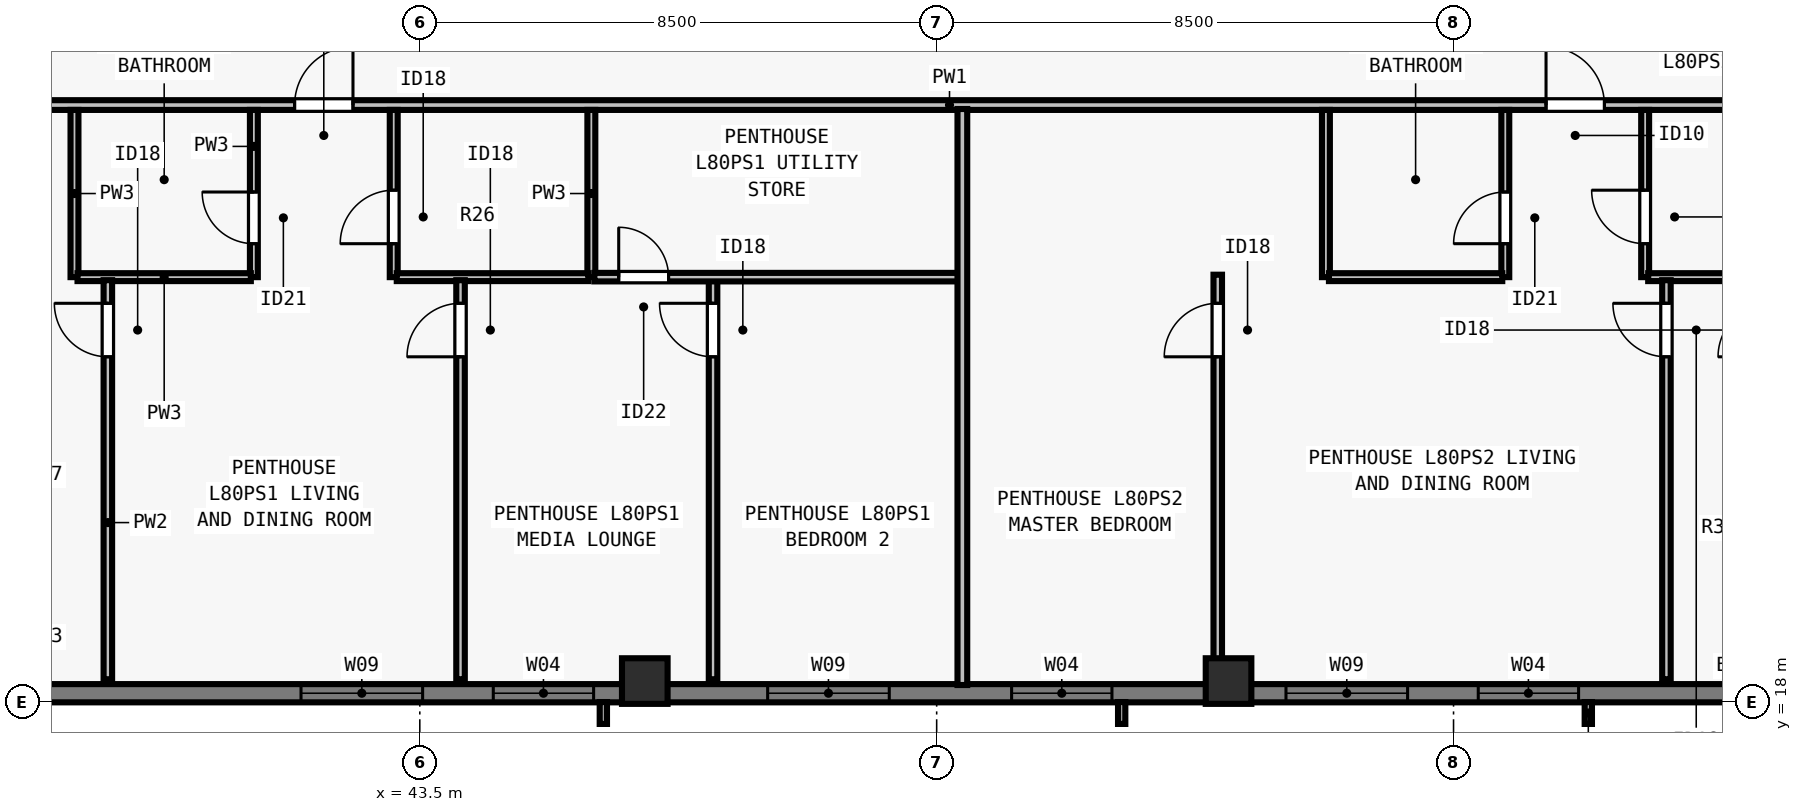
"""IFC4 building model, lengths in metres.
Left out: names, types, materials, properties, quantities, classifications, styles, units other than length and angle.
Written with IfcOpenShell. Run it as: python <this file> out.ifc"""

import sys

from ifc_helpers import new_model, si_unit, direction, frame, frame_2d, origin, origin_2d, place, context, subcontext, project, spatial, rectangle, extrude, element, fill, save


model = new_model("IFC4")
c1 = context("Model", 3, precision=1e-05, world=origin(), true_north=direction((0.0, 1.0)))
c2 = subcontext(c1, "Body", "Model", "MODEL_VIEW")
j1 = project(units=[si_unit("LENGTHUNIT", "METRE"), si_unit("PLANEANGLEUNIT", "RADIAN")], contexts=[c1])
p1 = place(None, origin())
s1 = spatial("IfcSite", under=j1, at=p1, CompositionType="ELEMENT")
p2 = place(p1, origin())
s2 = spatial("IfcBuilding", under=s1, at=p2, CompositionType="ELEMENT")
p3 = place(p2, frame((0.0, 0.0, 291.0)))
s3 = spatial("IfcBuildingStorey", under=s2, at=p3, CompositionType="ELEMENT", Elevation=291.0)
for number, where, z_axis, x_axis in (
    (1, (47.2, 18.35, 0.0), (0.0, 0.0, 1.0), (1.0, 0.0, 0.0)),
    (2, (56.8, 18.35, 0.0), (0.0, 0.0, 1.0), (1.0, 0.0, 0.0)),
):
    element("IfcColumn", number, at=place(p3, frame(where, z_axis=z_axis, x_axis=x_axis)), inside=s3, PredefinedType="COLUMN", context=c2, shape_type="SweptSolid", body=[
        extrude(rectangle(XDim=0.75, YDim=0.75, at=origin_2d()), origin(), (0.0, 0.0, 1.0), 3.5),
    ])
p4 = place(p3, frame((67.5, 18.15, 0.0), z_axis=(0.0, 0.0, 1.0), x_axis=(-1.0, 0.0, 0.0)))
e3 = element("IfcWall", 3, at=p4, inside=s3, PredefinedType="SOLIDWALL", context=c2, shape_type="SweptSolid", body=[
    extrude(rectangle(XDim=30.722, YDim=0.3, at=frame_2d((15.361, 0.0))), origin(), (0.0, 0.0, 1.0), 3.29),
])
p5 = place(p4, frame((4.944, 0.0, 0.8)))
e4 = element("IfcOpeningElement", 4, at=p5, cuts=e3, PredefinedType="OPENING", context=c2, shape_type="SweptSolid", body=[
    extrude(rectangle(XDim=1.65, YDim=1.758, at=frame_2d((0.825, 0.879))), frame((0.0, 0.16, 0.0), z_axis=(0.0, -1.0, 0.0), x_axis=(1.0, 0.0, 0.0)), (0.0, 0.0, 1.0), 0.32),
])
p6 = place(p4, frame((7.756, 0.0, 0.8)))
e5 = element("IfcOpeningElement", 5, at=p6, cuts=e3, PredefinedType="OPENING", context=c2, shape_type="SweptSolid", body=[
    extrude(rectangle(XDim=2.0, YDim=1.758, at=frame_2d((1.0, 0.879))), frame((0.0, 0.16, 0.0), z_axis=(0.0, -1.0, 0.0), x_axis=(1.0, 0.0, 0.0)), (0.0, 0.0, 1.0), 0.32),
])
p7 = place(p4, frame((12.617, 0.0, 0.8)))
e6 = element("IfcOpeningElement", 6, at=p7, cuts=e3, PredefinedType="OPENING", context=c2, shape_type="SweptSolid", body=[
    extrude(rectangle(XDim=1.65, YDim=1.758, at=frame_2d((0.825, 0.879))), frame((0.0, 0.16, 0.0), z_axis=(0.0, -1.0, 0.0), x_axis=(1.0, 0.0, 0.0)), (0.0, 0.0, 1.0), 0.32),
])
p8 = place(p4, frame((16.28, 0.0, 0.8)))
e7 = element("IfcOpeningElement", 7, at=p8, cuts=e3, PredefinedType="OPENING", context=c2, shape_type="SweptSolid", body=[
    extrude(rectangle(XDim=2.0, YDim=1.758, at=frame_2d((1.0, 0.879))), frame((0.0, 0.16, 0.0), z_axis=(0.0, -1.0, 0.0), x_axis=(1.0, 0.0, 0.0)), (0.0, 0.0, 1.0), 0.32),
])
p9 = place(p4, frame((21.142, 0.0, 0.8)))
e8 = element("IfcOpeningElement", 8, at=p9, cuts=e3, PredefinedType="OPENING", context=c2, shape_type="SweptSolid", body=[
    extrude(rectangle(XDim=1.65, YDim=1.758, at=frame_2d((0.825, 0.879))), frame((0.0, 0.16, 0.0), z_axis=(0.0, -1.0, 0.0), x_axis=(1.0, 0.0, 0.0)), (0.0, 0.0, 1.0), 0.32),
])
p10 = place(p4, frame((23.954, 0.0, 0.8)))
e9 = element("IfcOpeningElement", 9, at=p10, cuts=e3, PredefinedType="OPENING", context=c2, shape_type="SweptSolid", body=[
    extrude(rectangle(XDim=2.0, YDim=1.758, at=frame_2d((1.0, 0.879))), frame((0.0, 0.16, 0.0), z_axis=(0.0, -1.0, 0.0), x_axis=(1.0, 0.0, 0.0)), (0.0, 0.0, 1.0), 0.32),
])
p11 = place(p3, frame((31.285, 27.823, 0.0), z_axis=(0.0, 0.0, 1.0), x_axis=(1.0, 0.0, 0.0)))
e10 = element("IfcWall", 10, at=p11, inside=s3, PredefinedType="PARTITIONING", context=c2, shape_type="SweptSolid", body=[
    extrude(rectangle(XDim=41.3, YDim=0.16, at=frame_2d((20.65, 0.0))), origin(), (0.0, 0.0, 1.0), 3.009),
])
p12 = place(p11, frame((10.156, 0.0, 0.0)))
e11 = element("IfcOpeningElement", 11, at=p12, cuts=e10, PredefinedType="OPENING", context=c2, shape_type="SweptSolid", body=[
    extrude(rectangle(XDim=0.96, YDim=2.18, at=frame_2d((0.48, 1.09))), frame((0.0, 0.09, 0.0), z_axis=(0.0, -1.0, 0.0), x_axis=(1.0, 0.0, 0.0)), (0.0, 0.0, 1.0), 0.18),
])
p13 = place(p11, frame((30.736, 0.0, 0.0)))
e12 = element("IfcOpeningElement", 12, at=p13, cuts=e10, PredefinedType="OPENING", context=c2, shape_type="SweptSolid", body=[
    extrude(rectangle(XDim=0.96, YDim=2.18, at=frame_2d((0.48, 1.09))), frame((0.0, 0.09, 0.0), z_axis=(0.0, -1.0, 0.0), x_axis=(1.0, 0.0, 0.0)), (0.0, 0.0, 1.0), 0.18),
])
p14 = place(p3, frame((37.821, 24.992, 0.0), z_axis=(0.0, 0.0, 1.0), x_axis=(0.0, 1.0, 0.0)))
e13 = element("IfcWall", 13, at=p14, inside=s3, PredefinedType="PLUMBINGWALL", context=c2, shape_type="SweptSolid", body=[
    extrude(rectangle(XDim=2.75, YDim=0.13, at=frame_2d((1.375, 0.0))), origin(), (0.0, 0.0, 1.0), 3.29),
])
p15 = place(p3, frame((40.771, 24.992, 0.0), z_axis=(0.0, 0.0, 1.0), x_axis=(0.0, 1.0, 0.0)))
e14 = element("IfcWall", 14, at=p15, inside=s3, PredefinedType="PLUMBINGWALL", context=c2, shape_type="SweptSolid", body=[
    extrude(rectangle(XDim=2.75, YDim=0.13, at=frame_2d((1.375, 0.0))), origin(), (0.0, 0.0, 1.0), 2.653),
])
p16 = place(p15, frame((0.55, 0.0, 0.0)))
e15 = element("IfcOpeningElement", 15, at=p16, cuts=e14, PredefinedType="OPENING", context=c2, shape_type="SweptSolid", body=[
    extrude(rectangle(XDim=0.85, YDim=2.08, at=frame_2d((0.425, 1.04))), frame((0.0, 0.075, 0.0), z_axis=(0.0, -1.0, 0.0), x_axis=(1.0, 0.0, 0.0)), (0.0, 0.0, 1.0), 0.15),
])
p17 = place(p3, frame((37.871, 24.992, 0.0), z_axis=(0.0, 0.0, 1.0), x_axis=(1.0, 0.0, 0.0)))
e16 = element("IfcWall", 16, at=p17, inside=s3, PredefinedType="PLUMBINGWALL", context=c2, shape_type="SweptSolid", body=[
    extrude(rectangle(XDim=2.85, YDim=0.13, at=frame_2d((1.425, 0.0))), origin(), (0.0, 0.0, 1.0), 3.29),
])
p18 = place(p3, frame((46.321, 24.992, 0.0), z_axis=(0.0, 0.0, 1.0), x_axis=(0.0, 1.0, 0.0)))
e17 = element("IfcWall", 17, at=p18, inside=s3, PredefinedType="PLUMBINGWALL", context=c2, shape_type="SweptSolid", body=[
    extrude(rectangle(XDim=2.75, YDim=0.13, at=frame_2d((1.375, 0.0))), origin(), (0.0, 0.0, 1.0), 3.29),
])
p19 = place(p3, frame((43.071, 24.992, 0.0), z_axis=(0.0, 0.0, 1.0), x_axis=(0.0, 1.0, 0.0)))
e18 = element("IfcWall", 18, at=p19, inside=s3, PredefinedType="PLUMBINGWALL", context=c2, shape_type="SweptSolid", body=[
    extrude(rectangle(XDim=2.75, YDim=0.13, at=frame_2d((1.375, 0.0))), origin(), (0.0, 0.0, 1.0), 3.29),
])
p20 = place(p19, frame((0.55, 0.0, 0.0)))
e19 = element("IfcOpeningElement", 19, at=p20, cuts=e18, PredefinedType="OPENING", context=c2, shape_type="SweptSolid", body=[
    extrude(rectangle(XDim=0.88, YDim=2.1, at=frame_2d((0.44, 1.05))), frame((0.0, 0.075, 0.0), z_axis=(0.0, -1.0, 0.0), x_axis=(1.0, 0.0, 0.0)), (0.0, 0.0, 1.0), 0.15),
])
p21 = place(p3, frame((43.121, 24.992, 0.0), z_axis=(0.0, 0.0, 1.0), x_axis=(1.0, 0.0, 0.0)))
e20 = element("IfcWall", 20, at=p21, inside=s3, PredefinedType="PLUMBINGWALL", context=c2, shape_type="SweptSolid", body=[
    extrude(rectangle(XDim=3.15, YDim=0.13, at=frame_2d((1.575, 0.0))), origin(), (0.0, 0.0, 1.0), 3.29),
])
p22 = place(p3, frame((38.37, 18.38, 0.0), z_axis=(0.0, 0.0, 1.0), x_axis=(0.0, 1.0, 0.0)))
e21 = element("IfcWall", 21, at=p22, inside=s3, PredefinedType="PARTITIONING", context=c2, shape_type="SweptSolid", body=[
    extrude(rectangle(XDim=6.562, YDim=0.14, at=frame_2d((3.281, 0.0))), origin(), (0.0, 0.0, 1.0), 2.653),
])
p23 = place(p22, frame((5.302, 0.0, 0.0)))
e22 = element("IfcOpeningElement", 22, at=p23, cuts=e21, PredefinedType="OPENING", context=c2, shape_type="SweptSolid", body=[
    extrude(rectangle(XDim=0.88, YDim=2.1, at=frame_2d((0.44, 1.05))), frame((0.0, 0.08, 0.0), z_axis=(0.0, -1.0, 0.0), x_axis=(1.0, 0.0, 0.0)), (0.0, 0.0, 1.0), 0.16),
])
p24 = place(p3, frame((48.323, 18.38, 0.0), z_axis=(0.0, 0.0, 1.0), x_axis=(0.0, 1.0, 0.0)))
e23 = element("IfcWall", 23, at=p24, inside=s3, PredefinedType="PARTITIONING", context=c2, shape_type="SweptSolid", body=[
    extrude(rectangle(XDim=6.653, YDim=0.14, at=frame_2d((3.326, 0.0))), origin(), (0.0, 0.0, 1.0), 3.009),
])
p25 = place(p24, frame((5.302, 0.0, 0.0)))
e24 = element("IfcOpeningElement", 24, at=p25, cuts=e23, PredefinedType="OPENING", context=c2, shape_type="SweptSolid", body=[
    extrude(rectangle(XDim=0.88, YDim=2.1, at=frame_2d((0.44, 1.05))), frame((0.0, 0.08, 0.0), z_axis=(0.0, -1.0, 0.0), x_axis=(1.0, 0.0, 0.0)), (0.0, 0.0, 1.0), 0.16),
])
p26 = place(p3, frame((46.371, 24.992, 0.0), z_axis=(0.0, 0.0, 1.0), x_axis=(1.0, 0.0, 0.0)))
e25 = element("IfcWall", 25, at=p26, inside=s3, PredefinedType="PARTITIONING", context=c2, shape_type="SweptSolid", body=[
    extrude(rectangle(XDim=6.101, YDim=0.14, at=frame_2d((3.051, 0.0))), origin(), (0.0, 0.0, 1.0), 3.29),
])
p27 = place(p26, frame((0.4, 0.0, 0.0)))
e26 = element("IfcOpeningElement", 26, at=p27, cuts=e25, PredefinedType="OPENING", context=c2, shape_type="SweptSolid", body=[
    extrude(rectangle(XDim=0.82, YDim=2.1, at=frame_2d((0.41, 1.05))), frame((0.0, 0.08, 0.0), z_axis=(0.0, -1.0, 0.0), x_axis=(1.0, 0.0, 0.0)), (0.0, 0.0, 1.0), 0.16),
])
p28 = place(p3, frame((44.17, 18.38, 0.0), z_axis=(0.0, 0.0, 1.0), x_axis=(0.0, 1.0, 0.0)))
e27 = element("IfcWall", 27, at=p28, inside=s3, PredefinedType="PARTITIONING", context=c2, shape_type="SweptSolid", body=[
    extrude(rectangle(XDim=6.562, YDim=0.14, at=frame_2d((3.281, 0.0))), origin(), (0.0, 0.0, 1.0), 3.29),
])
p29 = place(p28, frame((5.302, 0.0, 0.0)))
e28 = element("IfcOpeningElement", 28, at=p29, cuts=e27, PredefinedType="OPENING", context=c2, shape_type="SweptSolid", body=[
    extrude(rectangle(XDim=0.88, YDim=2.1, at=frame_2d((0.44, 1.05))), frame((0.0, 0.08, 0.0), z_axis=(0.0, -1.0, 0.0), x_axis=(1.0, 0.0, 0.0)), (0.0, 0.0, 1.0), 0.16),
])
p30 = place(p3, frame((52.423, 18.285, 0.0), z_axis=(0.0, 0.0, 1.0), x_axis=(0.0, 1.0, 0.0)))
e29 = element("IfcWall", 29, at=p30, inside=s3, PredefinedType="PARTITIONING", context=c2, shape_type="SweptSolid", body=[
    extrude(rectangle(XDim=9.473, YDim=0.16, at=frame_2d((4.736, 0.0))), origin(), (0.0, 0.0, 1.0), 3.009),
])
p31 = place(p3, frame((58.401, 24.992, 0.0), z_axis=(0.0, 0.0, 1.0), x_axis=(0.0, 1.0, 0.0)))
e30 = element("IfcWall", 30, at=p31, inside=s3, PredefinedType="PLUMBINGWALL", context=c2, shape_type="SweptSolid", body=[
    extrude(rectangle(XDim=2.75, YDim=0.13, at=frame_2d((1.375, 0.0))), origin(), (0.0, 0.0, 1.0), 3.29),
])
p32 = place(p3, frame((61.351, 24.992, 0.0), z_axis=(0.0, 0.0, 1.0), x_axis=(0.0, 1.0, 0.0)))
e31 = element("IfcWall", 31, at=p32, inside=s3, PredefinedType="PLUMBINGWALL", context=c2, shape_type="SweptSolid", body=[
    extrude(rectangle(XDim=2.75, YDim=0.13, at=frame_2d((1.375, 0.0))), origin(), (0.0, 0.0, 1.0), 3.29),
])
p33 = place(p32, frame((0.55, 0.0, 0.0)))
e32 = element("IfcOpeningElement", 32, at=p33, cuts=e31, PredefinedType="OPENING", context=c2, shape_type="SweptSolid", body=[
    extrude(rectangle(XDim=0.85, YDim=2.08, at=frame_2d((0.425, 1.04))), frame((0.0, 0.075, 0.0), z_axis=(0.0, -1.0, 0.0), x_axis=(1.0, 0.0, 0.0)), (0.0, 0.0, 1.0), 0.15),
])
p34 = place(p3, frame((58.451, 24.992, 0.0), z_axis=(0.0, 0.0, 1.0), x_axis=(1.0, 0.0, 0.0)))
e33 = element("IfcWall", 33, at=p34, inside=s3, PredefinedType="PLUMBINGWALL", context=c2, shape_type="SweptSolid", body=[
    extrude(rectangle(XDim=2.85, YDim=0.13, at=frame_2d((1.425, 0.0))), origin(), (0.0, 0.0, 1.0), 3.29),
])
p35 = place(p3, frame((63.651, 24.992, 0.0), z_axis=(0.0, 0.0, 1.0), x_axis=(0.0, 1.0, 0.0)))
e34 = element("IfcWall", 34, at=p35, inside=s3, PredefinedType="PLUMBINGWALL", context=c2, shape_type="SweptSolid", body=[
    extrude(rectangle(XDim=2.75, YDim=0.13, at=frame_2d((1.375, 0.0))), origin(), (0.0, 0.0, 1.0), 2.653),
])
p36 = place(p35, frame((0.55, 0.0, 0.0)))
e35 = element("IfcOpeningElement", 35, at=p36, cuts=e34, PredefinedType="OPENING", context=c2, shape_type="SweptSolid", body=[
    extrude(rectangle(XDim=0.88, YDim=2.1, at=frame_2d((0.44, 1.05))), frame((0.0, 0.075, 0.0), z_axis=(0.0, -1.0, 0.0), x_axis=(1.0, 0.0, 0.0)), (0.0, 0.0, 1.0), 0.15),
])
p37 = place(p3, frame((63.701, 24.992, 0.0), z_axis=(0.0, 0.0, 1.0), x_axis=(1.0, 0.0, 0.0)))
e36 = element("IfcWall", 36, at=p37, inside=s3, PredefinedType="PLUMBINGWALL", context=c2, shape_type="SweptSolid", body=[
    extrude(rectangle(XDim=3.15, YDim=0.13, at=frame_2d((1.575, 0.0))), origin(), (0.0, 0.0, 1.0), 3.29),
])
p38 = place(p3, frame((56.623, 18.38, 0.0), z_axis=(0.0, 0.0, 1.0), x_axis=(0.0, 1.0, 0.0)))
e37 = element("IfcWall", 37, at=p38, inside=s3, PredefinedType="PARTITIONING", context=c2, shape_type="SweptSolid", body=[
    extrude(rectangle(XDim=6.653, YDim=0.14, at=frame_2d((3.326, 0.0))), origin(), (0.0, 0.0, 1.0), 2.653),
])
p39 = place(p38, frame((5.302, 0.0, 0.0)))
e38 = element("IfcOpeningElement", 38, at=p39, cuts=e37, PredefinedType="OPENING", context=c2, shape_type="SweptSolid", body=[
    extrude(rectangle(XDim=0.88, YDim=2.1, at=frame_2d((0.44, 1.05))), frame((0.0, 0.08, 0.0), z_axis=(0.0, -1.0, 0.0), x_axis=(1.0, 0.0, 0.0)), (0.0, 0.0, 1.0), 0.16),
])
p40 = place(p3, frame((64.001, 18.38, 0.0), z_axis=(0.0, 0.0, 1.0), x_axis=(0.0, 1.0, 0.0)))
e39 = element("IfcWall", 39, at=p40, inside=s3, PredefinedType="PARTITIONING", context=c2, shape_type="SweptSolid", body=[
    extrude(rectangle(XDim=6.562, YDim=0.14, at=frame_2d((3.281, 0.0))), origin(), (0.0, 0.0, 1.0), 2.653),
])
p41 = place(p40, frame((5.302, 0.0, 0.0)))
e40 = element("IfcOpeningElement", 40, at=p41, cuts=e39, PredefinedType="OPENING", context=c2, shape_type="SweptSolid", body=[
    extrude(rectangle(XDim=0.88, YDim=2.1, at=frame_2d((0.44, 1.05))), frame((0.0, 0.08, 0.0), z_axis=(0.0, -1.0, 0.0), x_axis=(1.0, 0.0, 0.0)), (0.0, 0.0, 1.0), 0.16),
])
p42 = place(p5, origin())
e41 = element("IfcWindow", 41, at=p42, inside=s3, PartitioningType="SINGLE_PANEL", PredefinedType="WINDOW", context=c2, shape_type="SweptSolid", body=[
    extrude(rectangle(XDim=1.65, YDim=1.758, at=frame_2d((0.825, 0.879))), frame((0.0, -0.05, 0.0), z_axis=(0.0, -1.0, 0.0), x_axis=(1.0, 0.0, 0.0)), (0.0, 0.0, 1.0), 0.06),
])
fill(e4, e41)
p43 = place(p6, origin())
e42 = element("IfcWindow", 42, at=p43, inside=s3, PartitioningType="SINGLE_PANEL", PredefinedType="WINDOW", context=c2, shape_type="SweptSolid", body=[
    extrude(rectangle(XDim=2.0, YDim=1.758, at=frame_2d((1.0, 0.879))), frame((0.0, -0.05, 0.0), z_axis=(0.0, -1.0, 0.0), x_axis=(1.0, 0.0, 0.0)), (0.0, 0.0, 1.0), 0.06),
])
fill(e5, e42)
p44 = place(p7, origin())
e43 = element("IfcWindow", 43, at=p44, inside=s3, PartitioningType="SINGLE_PANEL", PredefinedType="WINDOW", context=c2, shape_type="SweptSolid", body=[
    extrude(rectangle(XDim=1.65, YDim=1.758, at=frame_2d((0.825, 0.879))), frame((0.0, -0.05, 0.0), z_axis=(0.0, -1.0, 0.0), x_axis=(1.0, 0.0, 0.0)), (0.0, 0.0, 1.0), 0.06),
])
fill(e6, e43)
p45 = place(p8, origin())
e44 = element("IfcWindow", 44, at=p45, inside=s3, PartitioningType="SINGLE_PANEL", PredefinedType="WINDOW", context=c2, shape_type="SweptSolid", body=[
    extrude(rectangle(XDim=2.0, YDim=1.758, at=frame_2d((1.0, 0.879))), frame((0.0, -0.05, 0.0), z_axis=(0.0, -1.0, 0.0), x_axis=(1.0, 0.0, 0.0)), (0.0, 0.0, 1.0), 0.06),
])
fill(e7, e44)
p46 = place(p9, origin())
e45 = element("IfcWindow", 45, at=p46, inside=s3, PartitioningType="SINGLE_PANEL", PredefinedType="WINDOW", context=c2, shape_type="SweptSolid", body=[
    extrude(rectangle(XDim=1.65, YDim=1.758, at=frame_2d((0.825, 0.879))), frame((0.0, -0.05, 0.0), z_axis=(0.0, -1.0, 0.0), x_axis=(1.0, 0.0, 0.0)), (0.0, 0.0, 1.0), 0.06),
])
fill(e8, e45)
p47 = place(p10, origin())
e46 = element("IfcWindow", 46, at=p47, inside=s3, PartitioningType="SINGLE_PANEL", PredefinedType="WINDOW", context=c2, shape_type="SweptSolid", body=[
    extrude(rectangle(XDim=2.0, YDim=1.758, at=frame_2d((1.0, 0.879))), frame((0.0, -0.05, 0.0), z_axis=(0.0, -1.0, 0.0), x_axis=(1.0, 0.0, 0.0)), (0.0, 0.0, 1.0), 0.06),
])
fill(e9, e46)
p48 = place(p16, origin())
e47 = element("IfcDoor", 47, at=p48, inside=s3, OperationType="SINGLE_SWING_RIGHT", PredefinedType="DOOR", context=c2, shape_type="SweptSolid", body=[
    extrude(rectangle(XDim=0.85, YDim=2.08, at=frame_2d((0.425, 1.04))), frame((0.0, 0.025, 0.0), z_axis=(0.0, -1.0, 0.0), x_axis=(1.0, 0.0, 0.0)), (0.0, 0.0, 1.0), 0.05),
])
fill(e15, e47)
p49 = place(p20, origin())
e48 = element("IfcDoor", 48, at=p49, inside=s3, OperationType="SINGLE_SWING_LEFT", PredefinedType="DOOR", context=c2, shape_type="SweptSolid", body=[
    extrude(rectangle(XDim=0.88, YDim=2.1, at=frame_2d((0.44, 1.05))), frame((0.0, 0.025, 0.0), z_axis=(0.0, -1.0, 0.0), x_axis=(1.0, 0.0, 0.0)), (0.0, 0.0, 1.0), 0.05),
])
fill(e19, e48)
p50 = place(p23, origin())
e49 = element("IfcDoor", 49, at=p50, inside=s3, OperationType="SINGLE_SWING_RIGHT", PredefinedType="DOOR", context=c2, shape_type="SweptSolid", body=[
    extrude(rectangle(XDim=0.88, YDim=2.1, at=frame_2d((0.44, 1.05))), frame((0.0, 0.025, 0.0), z_axis=(0.0, -1.0, 0.0), x_axis=(1.0, 0.0, 0.0)), (0.0, 0.0, 1.0), 0.05),
])
fill(e22, e49)
p51 = place(p27, origin())
e50 = element("IfcDoor", 50, at=p51, inside=s3, OperationType="SINGLE_SWING_LEFT", PredefinedType="DOOR", context=c2, shape_type="SweptSolid", body=[
    extrude(rectangle(XDim=0.82, YDim=2.1, at=frame_2d((0.41, 1.05))), frame((0.0, 0.025, 0.0), z_axis=(0.0, -1.0, 0.0), x_axis=(1.0, 0.0, 0.0)), (0.0, 0.0, 1.0), 0.05),
])
fill(e26, e50)
p52 = place(p25, origin())
e51 = element("IfcDoor", 51, at=p52, inside=s3, OperationType="SINGLE_SWING_RIGHT", PredefinedType="DOOR", context=c2, shape_type="SweptSolid", body=[
    extrude(rectangle(XDim=0.88, YDim=2.1, at=frame_2d((0.44, 1.05))), frame((0.0, 0.025, 0.0), z_axis=(0.0, -1.0, 0.0), x_axis=(1.0, 0.0, 0.0)), (0.0, 0.0, 1.0), 0.05),
])
fill(e24, e51)
p53 = place(p29, origin())
e52 = element("IfcDoor", 52, at=p53, inside=s3, OperationType="SINGLE_SWING_LEFT", PredefinedType="DOOR", context=c2, shape_type="SweptSolid", body=[
    extrude(rectangle(XDim=0.88, YDim=2.1, at=frame_2d((0.44, 1.05))), frame((0.0, 0.025, 0.0), z_axis=(0.0, -1.0, 0.0), x_axis=(1.0, 0.0, 0.0)), (0.0, 0.0, 1.0), 0.05),
])
fill(e28, e52)
p54 = place(p12, origin())
e53 = element("IfcDoor", 53, at=p54, inside=s3, OperationType="SINGLE_SWING_RIGHT", PredefinedType="DOOR", context=c2, shape_type="SweptSolid", body=[
    extrude(rectangle(XDim=0.96, YDim=2.18, at=frame_2d((0.48, 1.09))), frame((0.0, 0.025, 0.0), z_axis=(0.0, -1.0, 0.0), x_axis=(1.0, 0.0, 0.0)), (0.0, 0.0, 1.0), 0.05),
])
fill(e11, e53)
p55 = place(p33, origin())
e54 = element("IfcDoor", 54, at=p55, inside=s3, OperationType="SINGLE_SWING_LEFT", PredefinedType="DOOR", context=c2, shape_type="SweptSolid", body=[
    extrude(rectangle(XDim=0.85, YDim=2.08, at=frame_2d((0.425, 1.04))), frame((0.0, 0.025, 0.0), z_axis=(0.0, -1.0, 0.0), x_axis=(1.0, 0.0, 0.0)), (0.0, 0.0, 1.0), 0.05),
])
fill(e32, e54)
p56 = place(p36, origin())
e55 = element("IfcDoor", 55, at=p56, inside=s3, OperationType="SINGLE_SWING_RIGHT", PredefinedType="DOOR", context=c2, shape_type="SweptSolid", body=[
    extrude(rectangle(XDim=0.88, YDim=2.1, at=frame_2d((0.44, 1.05))), frame((0.0, 0.025, 0.0), z_axis=(0.0, -1.0, 0.0), x_axis=(1.0, 0.0, 0.0)), (0.0, 0.0, 1.0), 0.05),
])
fill(e35, e55)
p57 = place(p39, origin())
e56 = element("IfcDoor", 56, at=p57, inside=s3, OperationType="SINGLE_SWING_LEFT", PredefinedType="DOOR", context=c2, shape_type="SweptSolid", body=[
    extrude(rectangle(XDim=0.88, YDim=2.1, at=frame_2d((0.44, 1.05))), frame((0.0, 0.025, 0.0), z_axis=(0.0, -1.0, 0.0), x_axis=(1.0, 0.0, 0.0)), (0.0, 0.0, 1.0), 0.05),
])
fill(e38, e56)
p58 = place(p41, origin())
e57 = element("IfcDoor", 57, at=p58, inside=s3, OperationType="SINGLE_SWING_RIGHT", PredefinedType="DOOR", context=c2, shape_type="SweptSolid", body=[
    extrude(rectangle(XDim=0.88, YDim=2.1, at=frame_2d((0.44, 1.05))), frame((0.0, 0.025, 0.0), z_axis=(0.0, -1.0, 0.0), x_axis=(1.0, 0.0, 0.0)), (0.0, 0.0, 1.0), 0.05),
])
fill(e40, e57)
p59 = place(p13, origin())
e58 = element("IfcDoor", 58, at=p59, inside=s3, OperationType="SINGLE_SWING_LEFT", PredefinedType="DOOR", context=c2, shape_type="SweptSolid", body=[
    extrude(rectangle(XDim=0.96, YDim=2.18, at=frame_2d((0.48, 1.09))), frame((0.0, 0.025, 0.0), z_axis=(0.0, -1.0, 0.0), x_axis=(1.0, 0.0, 0.0)), (0.0, 0.0, 1.0), 0.05),
])
fill(e12, e58)
save(model, sys.argv[1])
